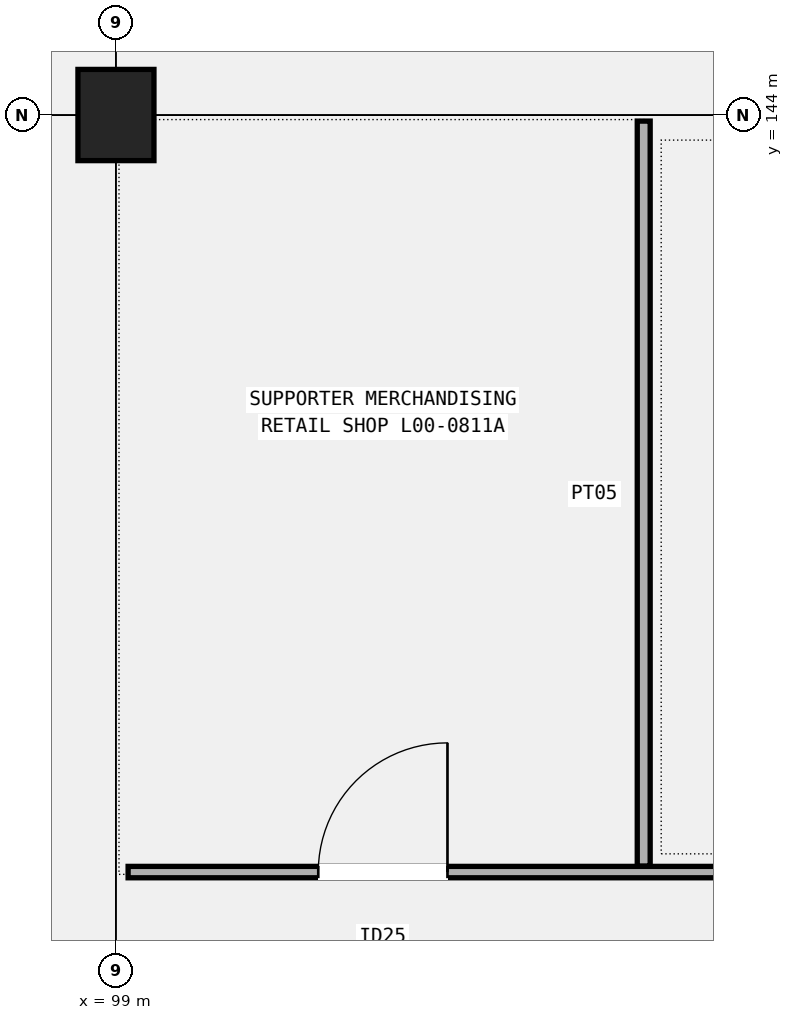
"""IFC4 building model, lengths in metres.
Left out: names, types, materials, properties, quantities, classifications, styles, units other than length and angle.
Written with IfcOpenShell. Run it as: python <this file> out.ifc"""

import sys

from ifc_helpers import new_model, si_unit, direction, frame, frame_2d, origin, origin_2d, place, context, subcontext, project, spatial, rectangle, extrude, element, fill, save


model = new_model("IFC4")
c1 = context("Model", 3, precision=1e-05, world=origin(), true_north=direction((0.0, 1.0)))
c2 = subcontext(c1, "Body", "Model", "MODEL_VIEW")
j1 = project(units=[si_unit("LENGTHUNIT", "METRE"), si_unit("PLANEANGLEUNIT", "RADIAN")], contexts=[c1])
p1 = place(None, origin())
s1 = spatial("IfcSite", under=j1, at=p1, CompositionType="ELEMENT")
p2 = place(p1, origin())
s2 = spatial("IfcBuilding", under=s1, at=p2, CompositionType="ELEMENT")
p3 = place(p2, origin())
s3 = spatial("IfcBuildingStorey", under=s2, at=p3, CompositionType="ELEMENT", Elevation=0.0)
p4 = place(p3, frame((99.0, 144.0, 0.0), z_axis=(0.0, 0.0, 1.0), x_axis=(1.0, 0.0, 0.0)))
e1 = element("IfcColumn", 1, at=p4, inside=s3, PredefinedType="COLUMN", context=c2, shape_type="SweptSolid", body=[
    extrude(rectangle(XDim=1.0, YDim=1.2, at=origin_2d()), origin(), (0.0, 0.0, 1.0), 5.4),
])
p5 = place(p3, frame((99.16, 134.04, 0.0), z_axis=(0.0, 0.0, 1.0), x_axis=(1.0, 0.0, 0.0)))
e2 = element("IfcWall", 2, at=p5, inside=s3, PredefinedType="PARTITIONING", context=c2, shape_type="SweptSolid", body=[
    extrude(rectangle(XDim=12.68, YDim=0.15, at=frame_2d((6.34, 0.0))), origin(), (0.0, 0.0, 1.0), 4.52),
])
p6 = place(p5, frame((2.502, 0.0, 0.0)))
e3 = element("IfcOpeningElement", 3, at=p6, cuts=e2, PredefinedType="OPENING", context=c2, shape_type="SweptSolid", body=[
    extrude(rectangle(XDim=1.7, YDim=2.32, at=frame_2d((0.85, 1.16))), frame((0.0, 0.085, 0.0), z_axis=(0.0, -1.0, 0.0), x_axis=(1.0, 0.0, 0.0)), (0.0, 0.0, 1.0), 0.17),
])
p7 = place(p5, frame((8.892, 0.0, 0.0)))
e4 = element("IfcOpeningElement", 4, at=p7, cuts=e2, PredefinedType="OPENING", context=c2, shape_type="SweptSolid", body=[
    extrude(rectangle(XDim=1.76, YDim=2.3, at=frame_2d((0.88, 1.15))), frame((0.0, 0.085, 0.0), z_axis=(0.0, -1.0, 0.0), x_axis=(1.0, 0.0, 0.0)), (0.0, 0.0, 1.0), 0.17),
])
p8 = place(p3, frame((105.944, 134.12, 0.0), z_axis=(0.0, 0.0, 1.0), x_axis=(0.0, 1.0, 0.0)))
e5 = element("IfcWall", 5, at=p8, inside=s3, PredefinedType="PARTITIONING", context=c2, shape_type="SweptSolid", body=[
    extrude(rectangle(XDim=9.8, YDim=0.17, at=frame_2d((4.9, 0.0))), origin(), (0.0, 0.0, 1.0), 4.52),
])
p9 = place(p6, origin())
e6 = element("IfcDoor", 6, at=p9, inside=s3, OperationType="SINGLE_SWING_RIGHT", PredefinedType="DOOR", context=c2, shape_type="SweptSolid", body=[
    extrude(rectangle(XDim=1.7, YDim=2.32, at=frame_2d((0.85, 1.16))), frame((0.0, 0.025, 0.0), z_axis=(0.0, -1.0, 0.0), x_axis=(1.0, 0.0, 0.0)), (0.0, 0.0, 1.0), 0.05),
])
fill(e3, e6)
save(model, sys.argv[1])
